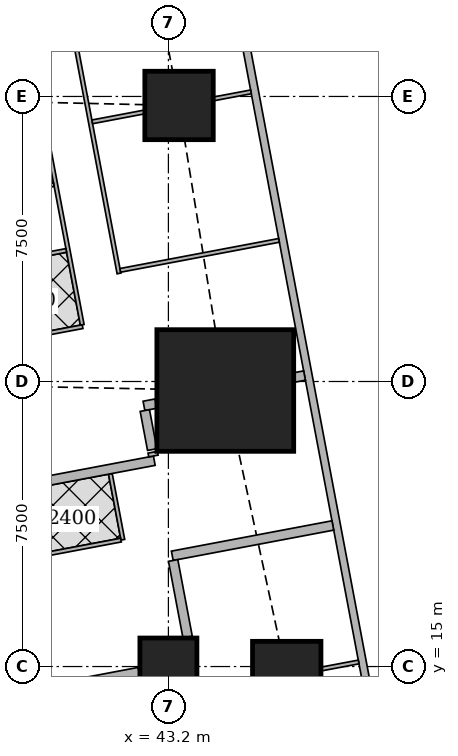
"""IFC4 building model, lengths in metres.
Left out: names, types, materials, properties, quantities, classifications, styles, units other than length and angle.
Written with IfcOpenShell. Run it as: python <this file> out.ifc"""

import sys

from ifc_helpers import new_model, si_unit, direction, frame, frame_2d, origin, origin_2d, place, context, subcontext, project, spatial, rectangle, extrude, element, fill, save


model = new_model("IFC4")
c1 = context("Model", 3, precision=1e-05, world=origin(), true_north=direction((0.0, 1.0)))
c2 = subcontext(c1, "Body", "Model", "MODEL_VIEW")
j1 = project(units=[si_unit("LENGTHUNIT", "METRE"), si_unit("PLANEANGLEUNIT", "RADIAN")], contexts=[c1])
p1 = place(None, origin())
s1 = spatial("IfcSite", under=j1, at=p1, CompositionType="ELEMENT")
p2 = place(p1, origin())
s2 = spatial("IfcBuilding", under=s1, at=p2, CompositionType="ELEMENT")
p3 = place(p2, frame((0.0, 0.0, 158.3)))
s3 = spatial("IfcBuildingStorey", under=s2, at=p3, CompositionType="ELEMENT", Elevation=158.3)
p4 = place(p3, frame((43.2, 15.0, 0.0), z_axis=(0.0, 0.0, 1.0), x_axis=(1.0, 0.0, 0.0)))
e1 = element("IfcColumn", 1, at=p4, inside=s3, PredefinedType="COLUMN", context=c2, shape_type="SweptSolid", body=[
    extrude(rectangle(XDim=1.5, YDim=1.5, at=origin_2d()), origin(), (0.0, 0.0, 1.0), 3.75),
])
p5 = place(p3, frame((46.314, 14.763, 0.0), z_axis=(0.0, 0.0, 1.0), x_axis=(1.0, 0.0, 0.0)))
e2 = element("IfcColumn", 2, at=p5, inside=s3, PredefinedType="COLUMN", context=c2, shape_type="SweptSolid", body=[
    extrude(rectangle(XDim=1.8, YDim=1.8, at=origin_2d()), origin(), (0.0, 0.0, 1.0), 3.75),
])
p6 = place(p3, frame((44.697, 22.263, 0.0), z_axis=(0.0, 0.0, 1.0), x_axis=(1.0, 0.0, 0.0)))
e3 = element("IfcColumn", 3, at=p6, inside=s3, PredefinedType="COLUMN", context=c2, shape_type="SweptSolid", body=[
    extrude(rectangle(XDim=3.6, YDim=3.2, at=origin_2d()), origin(), (0.0, 0.0, 1.0), 3.75),
])
p7 = place(p3, frame((43.48, 29.763, 0.0), z_axis=(0.0, 0.0, 1.0), x_axis=(1.0, 0.0, 0.0)))
e4 = element("IfcColumn", 4, at=p7, inside=s3, PredefinedType="COLUMN", context=c2, shape_type="SweptSolid", body=[
    extrude(rectangle(XDim=1.8, YDim=1.8, at=origin_2d()), origin(), (0.0, 0.0, 1.0), 3.75),
])
p8 = place(p3, frame((50.653, 2.703, 0.0), z_axis=(0.0, 0.0, 1.0), x_axis=(-0.185612026696, 0.982623109613, 0.0)))
e5 = element("IfcWall", 5, at=p8, inside=s3, PredefinedType="SOLIDWALL", context=c2, shape_type="SweptSolid", body=[
    extrude(rectangle(XDim=41.393, YDim=0.2, at=frame_2d((20.697, 0.0))), origin(), (0.0, 0.0, 1.0), 3.5),
])
p9 = place(p8, frame((1.633, 0.0, 0.9)))
e6 = element("IfcOpeningElement", 6, at=p9, cuts=e5, PredefinedType="OPENING", context=c2, shape_type="SweptSolid", body=[
    extrude(rectangle(XDim=1.8, YDim=1.5, at=frame_2d((0.9, 0.75))), frame((0.0, 0.11, 0.0), z_axis=(0.0, -1.0, 0.0), x_axis=(1.0, 0.0, 0.0)), (0.0, 0.0, 1.0), 0.22),
])
p10 = place(p8, frame((6.032, 0.0, 0.9)))
e7 = element("IfcOpeningElement", 7, at=p10, cuts=e5, PredefinedType="OPENING", context=c2, shape_type="SweptSolid", body=[
    extrude(rectangle(XDim=1.8, YDim=1.5, at=frame_2d((0.9, 0.75))), frame((0.0, 0.11, 0.0), z_axis=(0.0, -1.0, 0.0), x_axis=(1.0, 0.0, 0.0)), (0.0, 0.0, 1.0), 0.22),
])
p11 = place(p8, frame((9.848, 0.0, 0.9)))
e8 = element("IfcOpeningElement", 8, at=p11, cuts=e5, PredefinedType="OPENING", context=c2, shape_type="SweptSolid", body=[
    extrude(rectangle(XDim=1.8, YDim=1.5, at=frame_2d((0.9, 0.75))), frame((0.0, 0.11, 0.0), z_axis=(0.0, -1.0, 0.0), x_axis=(1.0, 0.0, 0.0)), (0.0, 0.0, 1.0), 0.22),
])
p12 = place(p8, frame((13.664, 0.0, 0.9)))
e9 = element("IfcOpeningElement", 9, at=p12, cuts=e5, PredefinedType="OPENING", context=c2, shape_type="SweptSolid", body=[
    extrude(rectangle(XDim=1.8, YDim=1.5, at=frame_2d((0.9, 0.75))), frame((0.0, 0.11, 0.0), z_axis=(0.0, -1.0, 0.0), x_axis=(1.0, 0.0, 0.0)), (0.0, 0.0, 1.0), 0.22),
])
p13 = place(p8, frame((17.481, 0.0, 0.9)))
e10 = element("IfcOpeningElement", 10, at=p13, cuts=e5, PredefinedType="OPENING", context=c2, shape_type="SweptSolid", body=[
    extrude(rectangle(XDim=1.8, YDim=1.5, at=frame_2d((0.9, 0.75))), frame((0.0, 0.11, 0.0), z_axis=(0.0, -1.0, 0.0), x_axis=(1.0, 0.0, 0.0)), (0.0, 0.0, 1.0), 0.22),
])
p14 = place(p8, frame((21.297, 0.0, 0.9)))
e11 = element("IfcOpeningElement", 11, at=p14, cuts=e5, PredefinedType="OPENING", context=c2, shape_type="SweptSolid", body=[
    extrude(rectangle(XDim=1.8, YDim=1.5, at=frame_2d((0.9, 0.75))), frame((0.0, 0.11, 0.0), z_axis=(0.0, -1.0, 0.0), x_axis=(1.0, 0.0, 0.0)), (0.0, 0.0, 1.0), 0.22),
])
p15 = place(p8, frame((25.113, 0.0, 0.9)))
e12 = element("IfcOpeningElement", 12, at=p15, cuts=e5, PredefinedType="OPENING", context=c2, shape_type="SweptSolid", body=[
    extrude(rectangle(XDim=1.8, YDim=1.5, at=frame_2d((0.9, 0.75))), frame((0.0, 0.11, 0.0), z_axis=(0.0, -1.0, 0.0), x_axis=(1.0, 0.0, 0.0)), (0.0, 0.0, 1.0), 0.22),
])
p16 = place(p8, frame((28.93, 0.0, 0.9)))
e13 = element("IfcOpeningElement", 13, at=p16, cuts=e5, PredefinedType="OPENING", context=c2, shape_type="SweptSolid", body=[
    extrude(rectangle(XDim=1.8, YDim=1.5, at=frame_2d((0.9, 0.75))), frame((0.0, 0.11, 0.0), z_axis=(0.0, -1.0, 0.0), x_axis=(1.0, 0.0, 0.0)), (0.0, 0.0, 1.0), 0.22),
])
p17 = place(p8, frame((32.746, 0.0, 0.9)))
e14 = element("IfcOpeningElement", 14, at=p17, cuts=e5, PredefinedType="OPENING", context=c2, shape_type="SweptSolid", body=[
    extrude(rectangle(XDim=1.8, YDim=1.5, at=frame_2d((0.9, 0.75))), frame((0.0, 0.11, 0.0), z_axis=(0.0, -1.0, 0.0), x_axis=(1.0, 0.0, 0.0)), (0.0, 0.0, 1.0), 0.22),
])
p18 = place(p8, frame((36.481, 0.0, 0.9)))
e15 = element("IfcOpeningElement", 15, at=p18, cuts=e5, PredefinedType="OPENING", context=c2, shape_type="SweptSolid", body=[
    extrude(rectangle(XDim=1.8, YDim=1.5, at=frame_2d((0.9, 0.75))), frame((0.0, 0.11, 0.0), z_axis=(0.0, -1.0, 0.0), x_axis=(1.0, 0.0, 0.0)), (0.0, 0.0, 1.0), 0.22),
])
p19 = place(p3, frame((33.623, 43.022, 0.0), z_axis=(0.0, 0.0, 1.0), x_axis=(0.185596841028, -0.98262597798, 0.0)))
e16 = element("IfcWall", 16, at=p19, inside=s3, PredefinedType="SOLIDWALL", context=c2, shape_type="SweptSolid", body=[
    extrude(rectangle(XDim=41.66, YDim=0.15, at=frame_2d((20.83, 0.0))), origin(), (0.0, 0.0, 1.0), 2.5),
])
p20 = place(p19, frame((21.514, 0.0, 0.0)))
e17 = element("IfcOpeningElement", 17, at=p20, cuts=e16, PredefinedType="OPENING", context=c2, shape_type="SweptSolid", body=[
    extrude(rectangle(XDim=1.0, YDim=2.1, at=frame_2d((0.5, 1.05))), frame((0.0, 0.085, 0.0), z_axis=(0.0, -1.0, 0.0), x_axis=(1.0, 0.0, 0.0)), (0.0, 0.0, 1.0), 0.17),
])
p21 = place(p19, frame((27.062, 0.0, 0.0)))
e18 = element("IfcOpeningElement", 18, at=p21, cuts=e16, PredefinedType="OPENING", context=c2, shape_type="SweptSolid", body=[
    extrude(rectangle(XDim=1.0, YDim=2.1, at=frame_2d((0.5, 1.05))), frame((0.0, 0.085, 0.0), z_axis=(0.0, -1.0, 0.0), x_axis=(1.0, 0.0, 0.0)), (0.0, 0.0, 1.0), 0.17),
])
p22 = place(p19, frame((29.934, 0.0, 0.0)))
e19 = element("IfcOpeningElement", 19, at=p22, cuts=e16, PredefinedType="OPENING", context=c2, shape_type="SweptSolid", body=[
    extrude(rectangle(XDim=1.0, YDim=2.1, at=frame_2d((0.5, 1.05))), frame((0.0, 0.085, 0.0), z_axis=(0.0, -1.0, 0.0), x_axis=(1.0, 0.0, 0.0)), (0.0, 0.0, 1.0), 0.17),
])
p23 = place(p3, frame((38.701, 42.27, 0.0), z_axis=(0.0, 0.0, 1.0), x_axis=(0.185644634212, -0.982616949675, 0.0)))
e20 = element("IfcWall", 20, at=p23, inside=s3, PredefinedType="PARTITIONING", context=c2, shape_type="SweptSolid", body=[
    extrude(rectangle(XDim=17.227, YDim=0.1, at=frame_2d((8.613, 0.0))), origin(), (0.0, 0.0, 1.0), 2.5),
])
p24 = place(p23, frame((16.054, 0.0, 0.0)))
e21 = element("IfcOpeningElement", 21, at=p24, cuts=e20, PredefinedType="OPENING", context=c2, shape_type="SweptSolid", body=[
    extrude(rectangle(XDim=0.9, YDim=2.1, at=frame_2d((0.45, 1.05))), frame((0.0, 0.06, 0.0), z_axis=(0.0, -1.0, 0.0), x_axis=(1.0, 0.0, 0.0)), (0.0, 0.0, 1.0), 0.12),
])
p25 = place(p23, frame((12.077, 0.0, 0.0)))
e22 = element("IfcOpeningElement", 22, at=p25, cuts=e20, PredefinedType="OPENING", context=c2, shape_type="SweptSolid", body=[
    extrude(rectangle(XDim=0.9, YDim=2.1, at=frame_2d((0.45, 1.05))), frame((0.0, 0.06, 0.0), z_axis=(0.0, -1.0, 0.0), x_axis=(1.0, 0.0, 0.0)), (0.0, 0.0, 1.0), 0.12),
])
p26 = place(p23, frame((8.42, 0.0, 0.0)))
e23 = element("IfcOpeningElement", 23, at=p26, cuts=e20, PredefinedType="OPENING", context=c2, shape_type="SweptSolid", body=[
    extrude(rectangle(XDim=0.9, YDim=2.1, at=frame_2d((0.45, 1.05))), frame((0.0, 0.06, 0.0), z_axis=(0.0, -1.0, 0.0), x_axis=(1.0, 0.0, 0.0)), (0.0, 0.0, 1.0), 0.12),
])
p27 = place(p23, frame((4.444, 0.0, 0.0)))
e24 = element("IfcOpeningElement", 24, at=p27, cuts=e20, PredefinedType="OPENING", context=c2, shape_type="SweptSolid", body=[
    extrude(rectangle(XDim=0.9, YDim=2.1, at=frame_2d((0.45, 1.05))), frame((0.0, 0.06, 0.0), z_axis=(0.0, -1.0, 0.0), x_axis=(1.0, 0.0, 0.0)), (0.0, 0.0, 1.0), 0.12),
])
p28 = place(p3, frame((37.411, 42.638, 0.0), z_axis=(0.0, 0.0, 1.0), x_axis=(0.185554598549, -0.982633955732, 0.0)))
e25 = element("IfcWall", 25, at=p28, inside=s3, PredefinedType="PARTITIONING", context=c2, shape_type="SweptSolid", body=[
    extrude(rectangle(XDim=18.976, YDim=0.1, at=frame_2d((9.488, 0.0))), origin(), (0.0, 0.0, 1.0), 2.5),
])
p29 = place(p28, frame((17.551, 0.0, 0.0)))
e26 = element("IfcOpeningElement", 26, at=p29, cuts=e25, PredefinedType="OPENING", context=c2, shape_type="SweptSolid", body=[
    extrude(rectangle(XDim=0.9, YDim=2.1, at=frame_2d((0.45, 1.05))), frame((0.0, 0.06, 0.0), z_axis=(0.0, -1.0, 0.0), x_axis=(1.0, 0.0, 0.0)), (0.0, 0.0, 1.0), 0.12),
])
p30 = place(p28, frame((13.959, 0.0, 0.0)))
e27 = element("IfcOpeningElement", 27, at=p30, cuts=e25, PredefinedType="OPENING", context=c2, shape_type="SweptSolid", body=[
    extrude(rectangle(XDim=0.9, YDim=2.1, at=frame_2d((0.45, 1.05))), frame((0.0, 0.06, 0.0), z_axis=(0.0, -1.0, 0.0), x_axis=(1.0, 0.0, 0.0)), (0.0, 0.0, 1.0), 0.12),
])
p31 = place(p28, frame((10.092, 0.0, 0.0)))
e28 = element("IfcOpeningElement", 28, at=p31, cuts=e25, PredefinedType="OPENING", context=c2, shape_type="SweptSolid", body=[
    extrude(rectangle(XDim=0.9, YDim=2.1, at=frame_2d((0.45, 1.05))), frame((0.0, 0.06, 0.0), z_axis=(0.0, -1.0, 0.0), x_axis=(1.0, 0.0, 0.0)), (0.0, 0.0, 1.0), 0.12),
])
p32 = place(p28, frame((5.731, 0.0, 0.0)))
e29 = element("IfcOpeningElement", 29, at=p32, cuts=e25, PredefinedType="OPENING", context=c2, shape_type="SweptSolid", body=[
    extrude(rectangle(XDim=0.9, YDim=2.1, at=frame_2d((0.45, 1.05))), frame((0.0, 0.06, 0.0), z_axis=(0.0, -1.0, 0.0), x_axis=(1.0, 0.0, 0.0)), (0.0, 0.0, 1.0), 0.12),
])
p33 = place(p28, frame((3.188, 0.0, 0.0)))
e30 = element("IfcOpeningElement", 30, at=p33, cuts=e25, PredefinedType="OPENING", context=c2, shape_type="SweptSolid", body=[
    extrude(rectangle(XDim=0.9, YDim=2.1, at=frame_2d((0.45, 1.05))), frame((0.0, 0.06, 0.0), z_axis=(0.0, -1.0, 0.0), x_axis=(1.0, 0.0, 0.0)), (0.0, 0.0, 1.0), 0.12),
])
p34 = place(p28, frame((0.15, 0.0, 0.0)))
e31 = element("IfcOpeningElement", 31, at=p34, cuts=e25, PredefinedType="OPENING", context=c2, shape_type="SweptSolid", body=[
    extrude(rectangle(XDim=0.9, YDim=2.1, at=frame_2d((0.45, 1.05))), frame((0.0, 0.06, 0.0), z_axis=(0.0, -1.0, 0.0), x_axis=(1.0, 0.0, 0.0)), (0.0, 0.0, 1.0), 0.12),
])
p35 = place(p28, frame((15.642, 0.0, 0.0)))
e32 = element("IfcOpeningElement", 32, at=p35, cuts=e25, PredefinedType="OPENING", context=c2, shape_type="SweptSolid", body=[
    extrude(rectangle(XDim=0.9, YDim=2.1, at=frame_2d((0.45, 1.05))), frame((0.0, 0.06, 0.0), z_axis=(0.0, -1.0, 0.0), x_axis=(1.0, 0.0, 0.0)), (0.0, 0.0, 1.0), 0.12),
])
p36 = place(p28, frame((12.051, 0.0, 0.0)))
e33 = element("IfcOpeningElement", 33, at=p36, cuts=e25, PredefinedType="OPENING", context=c2, shape_type="SweptSolid", body=[
    extrude(rectangle(XDim=0.9, YDim=2.1, at=frame_2d((0.45, 1.05))), frame((0.0, 0.06, 0.0), z_axis=(0.0, -1.0, 0.0), x_axis=(1.0, 0.0, 0.0)), (0.0, 0.0, 1.0), 0.12),
])
p37 = place(p28, frame((8.185, 0.0, 0.0)))
e34 = element("IfcOpeningElement", 34, at=p37, cuts=e25, PredefinedType="OPENING", context=c2, shape_type="SweptSolid", body=[
    extrude(rectangle(XDim=0.9, YDim=2.1, at=frame_2d((0.45, 1.05))), frame((0.0, 0.06, 0.0), z_axis=(0.0, -1.0, 0.0), x_axis=(1.0, 0.0, 0.0)), (0.0, 0.0, 1.0), 0.12),
])
p38 = place(p3, frame((45.372, 30.121, 0.0), z_axis=(0.0, 0.0, 1.0), x_axis=(-0.982708646087, -0.185158626332, 0.0)))
e35 = element("IfcWall", 35, at=p38, inside=s3, PredefinedType="PARTITIONING", context=c2, shape_type="SweptSolid", body=[
    extrude(rectangle(XDim=1.0, YDim=0.1, at=frame_2d((0.5, 0.0))), origin(), (0.0, 0.0, 1.0), 3.5),
])
p39 = place(p3, frame((42.57, 29.592, 0.0), z_axis=(0.0, 0.0, 1.0), x_axis=(-0.982562488259, -0.185932667021, 0.0)))
e36 = element("IfcWall", 36, at=p39, inside=s3, PredefinedType="PARTITIONING", context=c2, shape_type="SweptSolid", body=[
    extrude(rectangle(XDim=1.398, YDim=0.1, at=frame_2d((0.699, 0.0))), origin(), (0.0, 0.0, 1.0), 2.5),
])
p40 = place(p3, frame((46.11, 26.213, 0.0), z_axis=(0.0, 0.0, 1.0), x_axis=(-0.982623519589, -0.185609856287, 0.0)))
e37 = element("IfcWall", 37, at=p40, inside=s3, PredefinedType="PARTITIONING", context=c2, shape_type="SweptSolid", body=[
    extrude(rectangle(XDim=4.25, YDim=0.1, at=frame_2d((2.125, 0.0))), origin(), (0.0, 0.0, 1.0), 2.1),
])
p41 = place(p3, frame((40.184, 27.683, 0.0), z_axis=(0.0, 0.0, 1.0), x_axis=(-0.982638553676, -0.185530247748, 0.0)))
e38 = element("IfcWall", 38, at=p41, inside=s3, PredefinedType="PARTITIONING", context=c2, shape_type="SweptSolid", body=[
    extrude(rectangle(XDim=3.525, YDim=0.1, at=frame_2d((1.763, 0.0))), origin(), (0.0, 0.0, 1.0), 3.5),
])
p42 = place(p3, frame((40.942, 23.943, 0.0), z_axis=(0.0, 0.0, 1.0), x_axis=(-0.982598214409, -0.185743772548, 0.0)))
e39 = element("IfcWall", 39, at=p42, inside=s3, PredefinedType="PARTITIONING", context=c2, shape_type="SweptSolid", body=[
    extrude(rectangle(XDim=3.575, YDim=0.1, at=frame_2d((1.788, 0.0))), origin(), (0.0, 0.0, 1.0), 3.5),
])
p43 = place(p3, frame((40.512, 25.948, 0.0), z_axis=(0.0, 0.0, 1.0), x_axis=(-0.982636169624, -0.185542874149, 0.0)))
e40 = element("IfcWall", 40, at=p43, inside=s3, PredefinedType="PARTITIONING", context=c2, shape_type="SweptSolid", body=[
    extrude(rectangle(XDim=3.525, YDim=0.1, at=frame_2d((1.763, 0.0))), origin(), (0.0, 0.0, 1.0), 3.5),
])
p44 = place(p3, frame((41.673, 20.07, 0.0), z_axis=(0.0, 0.0, 1.0), x_axis=(0.185783379659, -0.98259072652, 0.0)))
e41 = element("IfcWall", 41, at=p44, inside=s3, PredefinedType="PARTITIONING", context=c2, shape_type="SweptSolid", body=[
    extrude(rectangle(XDim=1.765, YDim=0.1, at=frame_2d((0.882, 0.0))), origin(), (0.0, 0.0, 1.0), 3.5),
])
p45 = place(p44, frame((0.374, 0.0, 0.0)))
e42 = element("IfcOpeningElement", 42, at=p45, cuts=e41, PredefinedType="OPENING", context=c2, shape_type="SweptSolid", body=[
    extrude(rectangle(XDim=0.9, YDim=2.1, at=frame_2d((0.45, 1.05))), frame((0.0, 0.06, 0.0), z_axis=(0.0, -1.0, 0.0), x_axis=(1.0, 0.0, 0.0)), (0.0, 0.0, 1.0), 0.12),
])
p46 = place(p3, frame((41.952, 18.327, 0.0), z_axis=(0.0, 0.0, 1.0), x_axis=(-0.982648794755, -0.185475998897, 0.0)))
e43 = element("IfcWall", 43, at=p46, inside=s3, PredefinedType="PARTITIONING", context=c2, shape_type="SweptSolid", body=[
    extrude(rectangle(XDim=3.525, YDim=0.1, at=frame_2d((1.763, 0.0))), origin(), (0.0, 0.0, 1.0), 3.5),
])
p47 = place(p3, frame((46.782, 22.657, 0.0), z_axis=(0.0, 0.0, 1.0), x_axis=(-0.982104607121, -0.188336243648, 0.0)))
e44 = element("IfcWall", 44, at=p47, inside=s3, PredefinedType="SOLIDWALL", context=c2, shape_type="SweptSolid", body=[
    extrude(rectangle(XDim=0.266, YDim=0.25, at=frame_2d((0.133, 0.0))), origin(), (0.0, 0.0, 1.0), 3.5),
])
p48 = place(p3, frame((42.873, 21.918, 0.0), z_axis=(0.0, 0.0, 1.0), x_axis=(-0.982431406936, -0.186624035603, 0.0)))
e45 = element("IfcWall", 45, at=p48, inside=s3, PredefinedType="SOLIDWALL", context=c2, shape_type="SweptSolid", body=[
    extrude(rectangle(XDim=0.322, YDim=0.25, at=frame_2d((0.161, 0.0))), origin(), (0.0, 0.0, 1.0), 2.5),
])
p49 = place(p3, frame((42.829, 20.416, 0.0), z_axis=(0.0, 0.0, 1.0), x_axis=(-0.982635807605, -0.185544791394, 0.0)))
e46 = element("IfcWall", 46, at=p49, inside=s3, PredefinedType="SOLIDWALL", context=c2, shape_type="SweptSolid", body=[
    extrude(rectangle(XDim=4.775, YDim=0.25, at=frame_2d((2.388, 0.0))), origin(), (0.0, 0.0, 1.0), 3.5),
])
p50 = place(p3, frame((42.58, 21.736, 0.0), z_axis=(0.0, 0.0, 1.0), x_axis=(0.185458925981, -0.982652017132, 0.0)))
e47 = element("IfcWall", 47, at=p50, inside=s3, PredefinedType="SOLIDWALL", context=c2, shape_type="SweptSolid", body=[
    extrude(rectangle(XDim=1.045, YDim=0.25, at=frame_2d((0.522, 0.0))), origin(), (0.0, 0.0, 1.0), 2.5),
])
p51 = place(p3, frame((42.787, 20.639, 0.0), z_axis=(0.0, 0.0, 1.0), x_axis=(0.185013851593, -0.982735913009, 0.0)))
e48 = element("IfcWall", 48, at=p51, inside=s3, PredefinedType="SOLIDWALL", context=c2, shape_type="SweptSolid", body=[
    extrude(rectangle(XDim=0.102, YDim=0.25, at=frame_2d((0.051, 0.0))), origin(), (0.0, 0.0, 1.0), 3.5),
])
p52 = place(p3, frame((48.206, 15.12, 0.0), z_axis=(0.0, 0.0, 1.0), x_axis=(-0.982700268498, -0.185203083919, 0.0)))
e49 = element("IfcWall", 49, at=p52, inside=s3, PredefinedType="PARTITIONING", context=c2, shape_type="SweptSolid", body=[
    extrude(rectangle(XDim=0.999, YDim=0.1, at=frame_2d((0.5, 0.0))), origin(), (0.0, 0.0, 1.0), 3.5),
])
p53 = place(p3, frame((47.527, 18.712, 0.0), z_axis=(0.0, 0.0, 1.0), x_axis=(-0.982633535512, -0.185556823879, 0.0)))
e50 = element("IfcWall", 50, at=p53, inside=s3, PredefinedType="SOLIDWALL", context=c2, shape_type="SweptSolid", body=[
    extrude(rectangle(XDim=4.3, YDim=0.25, at=frame_2d((2.15, 0.0))), origin(), (0.0, 0.0, 1.0), 2.1),
])
p54 = place(p3, frame((42.426, 14.854, 0.0), z_axis=(0.0, 0.0, 1.0), x_axis=(-0.982580325536, -0.185838381047, 0.0)))
e51 = element("IfcWall", 51, at=p54, inside=s3, PredefinedType="SOLIDWALL", context=c2, shape_type="SweptSolid", body=[
    extrude(rectangle(XDim=3.347, YDim=0.25, at=frame_2d((1.674, 0.0))), origin(), (0.0, 0.0, 1.0), 3.5),
])
p55 = place(p3, frame((43.325, 17.791, 0.0), z_axis=(0.0, 0.0, 1.0), x_axis=(0.185652708443, -0.982615424186, 0.0)))
e52 = element("IfcWall", 52, at=p55, inside=s3, PredefinedType="SOLIDWALL", context=c2, shape_type="SweptSolid", body=[
    extrude(rectangle(XDim=2.053, YDim=0.25, at=frame_2d((1.026, 0.0))), origin(), (0.0, 0.0, 1.0), 3.5),
])
p56 = place(p12, origin())
e53 = element("IfcWindow", 53, at=p56, inside=s3, PartitioningType="SINGLE_PANEL", PredefinedType="WINDOW", context=c2, shape_type="SweptSolid", body=[
    extrude(rectangle(XDim=1.8, YDim=1.5, at=frame_2d((0.9, 0.75))), frame((0.0, 0.03, 0.0), z_axis=(0.0, -1.0, 0.0), x_axis=(1.0, 0.0, 0.0)), (0.0, 0.0, 1.0), 0.06),
])
fill(e9, e53)
p57 = place(p13, origin())
e54 = element("IfcWindow", 54, at=p57, inside=s3, PartitioningType="SINGLE_PANEL", PredefinedType="WINDOW", context=c2, shape_type="SweptSolid", body=[
    extrude(rectangle(XDim=1.8, YDim=1.5, at=frame_2d((0.9, 0.75))), frame((0.0, 0.03, 0.0), z_axis=(0.0, -1.0, 0.0), x_axis=(1.0, 0.0, 0.0)), (0.0, 0.0, 1.0), 0.06),
])
fill(e10, e54)
p58 = place(p14, origin())
e55 = element("IfcWindow", 55, at=p58, inside=s3, PartitioningType="SINGLE_PANEL", PredefinedType="WINDOW", context=c2, shape_type="SweptSolid", body=[
    extrude(rectangle(XDim=1.8, YDim=1.5, at=frame_2d((0.9, 0.75))), frame((0.0, 0.03, 0.0), z_axis=(0.0, -1.0, 0.0), x_axis=(1.0, 0.0, 0.0)), (0.0, 0.0, 1.0), 0.06),
])
fill(e11, e55)
p59 = place(p15, origin())
e56 = element("IfcWindow", 56, at=p59, inside=s3, PartitioningType="SINGLE_PANEL", PredefinedType="WINDOW", context=c2, shape_type="SweptSolid", body=[
    extrude(rectangle(XDim=1.8, YDim=1.5, at=frame_2d((0.9, 0.75))), frame((0.0, 0.03, 0.0), z_axis=(0.0, -1.0, 0.0), x_axis=(1.0, 0.0, 0.0)), (0.0, 0.0, 1.0), 0.06),
])
fill(e12, e56)
p60 = place(p16, origin())
e57 = element("IfcWindow", 57, at=p60, inside=s3, PartitioningType="SINGLE_PANEL", PredefinedType="WINDOW", context=c2, shape_type="SweptSolid", body=[
    extrude(rectangle(XDim=1.8, YDim=1.5, at=frame_2d((0.9, 0.75))), frame((0.0, 0.03, 0.0), z_axis=(0.0, -1.0, 0.0), x_axis=(1.0, 0.0, 0.0)), (0.0, 0.0, 1.0), 0.06),
])
fill(e13, e57)
p61 = place(p24, origin())
e58 = element("IfcDoor", 58, at=p61, inside=s3, OperationType="SINGLE_SWING_RIGHT", PredefinedType="DOOR", context=c2, shape_type="SweptSolid", body=[
    extrude(rectangle(XDim=0.9, YDim=2.1, at=frame_2d((0.45, 1.05))), frame((0.0, 0.025, 0.0), z_axis=(0.0, -1.0, 0.0), x_axis=(1.0, 0.0, 0.0)), (0.0, 0.0, 1.0), 0.05),
])
fill(e21, e58)
p62 = place(p25, origin())
e59 = element("IfcDoor", 59, at=p62, inside=s3, OperationType="SINGLE_SWING_RIGHT", PredefinedType="DOOR", context=c2, shape_type="SweptSolid", body=[
    extrude(rectangle(XDim=0.9, YDim=2.1, at=frame_2d((0.45, 1.05))), frame((0.0, 0.025, 0.0), z_axis=(0.0, -1.0, 0.0), x_axis=(1.0, 0.0, 0.0)), (0.0, 0.0, 1.0), 0.05),
])
fill(e22, e59)
p63 = place(p29, origin())
e60 = element("IfcDoor", 60, at=p63, inside=s3, OperationType="SINGLE_SWING_LEFT", PredefinedType="DOOR", context=c2, shape_type="SweptSolid", body=[
    extrude(rectangle(XDim=0.9, YDim=2.1, at=frame_2d((0.45, 1.05))), frame((0.0, 0.025, 0.0), z_axis=(0.0, -1.0, 0.0), x_axis=(1.0, 0.0, 0.0)), (0.0, 0.0, 1.0), 0.05),
])
fill(e26, e60)
p64 = place(p30, origin())
e61 = element("IfcDoor", 61, at=p64, inside=s3, OperationType="SINGLE_SWING_LEFT", PredefinedType="DOOR", context=c2, shape_type="SweptSolid", body=[
    extrude(rectangle(XDim=0.9, YDim=2.1, at=frame_2d((0.45, 1.05))), frame((0.0, 0.025, 0.0), z_axis=(0.0, -1.0, 0.0), x_axis=(1.0, 0.0, 0.0)), (0.0, 0.0, 1.0), 0.05),
])
fill(e27, e61)
p65 = place(p35, origin())
e62 = element("IfcDoor", 62, at=p65, inside=s3, OperationType="SINGLE_SWING_RIGHT", PredefinedType="DOOR", context=c2, shape_type="SweptSolid", body=[
    extrude(rectangle(XDim=0.9, YDim=2.1, at=frame_2d((0.45, 1.05))), frame((0.0, 0.025, 0.0), z_axis=(0.0, -1.0, 0.0), x_axis=(1.0, 0.0, 0.0)), (0.0, 0.0, 1.0), 0.05),
])
fill(e32, e62)
p66 = place(p45, origin())
e63 = element("IfcDoor", 63, at=p66, inside=s3, OperationType="SINGLE_SWING_RIGHT", PredefinedType="DOOR", context=c2, shape_type="SweptSolid", body=[
    extrude(rectangle(XDim=0.9, YDim=2.1, at=frame_2d((0.45, 1.05))), frame((0.0, 0.025, 0.0), z_axis=(0.0, -1.0, 0.0), x_axis=(1.0, 0.0, 0.0)), (0.0, 0.0, 1.0), 0.05),
])
fill(e42, e63)
save(model, sys.argv[1])
